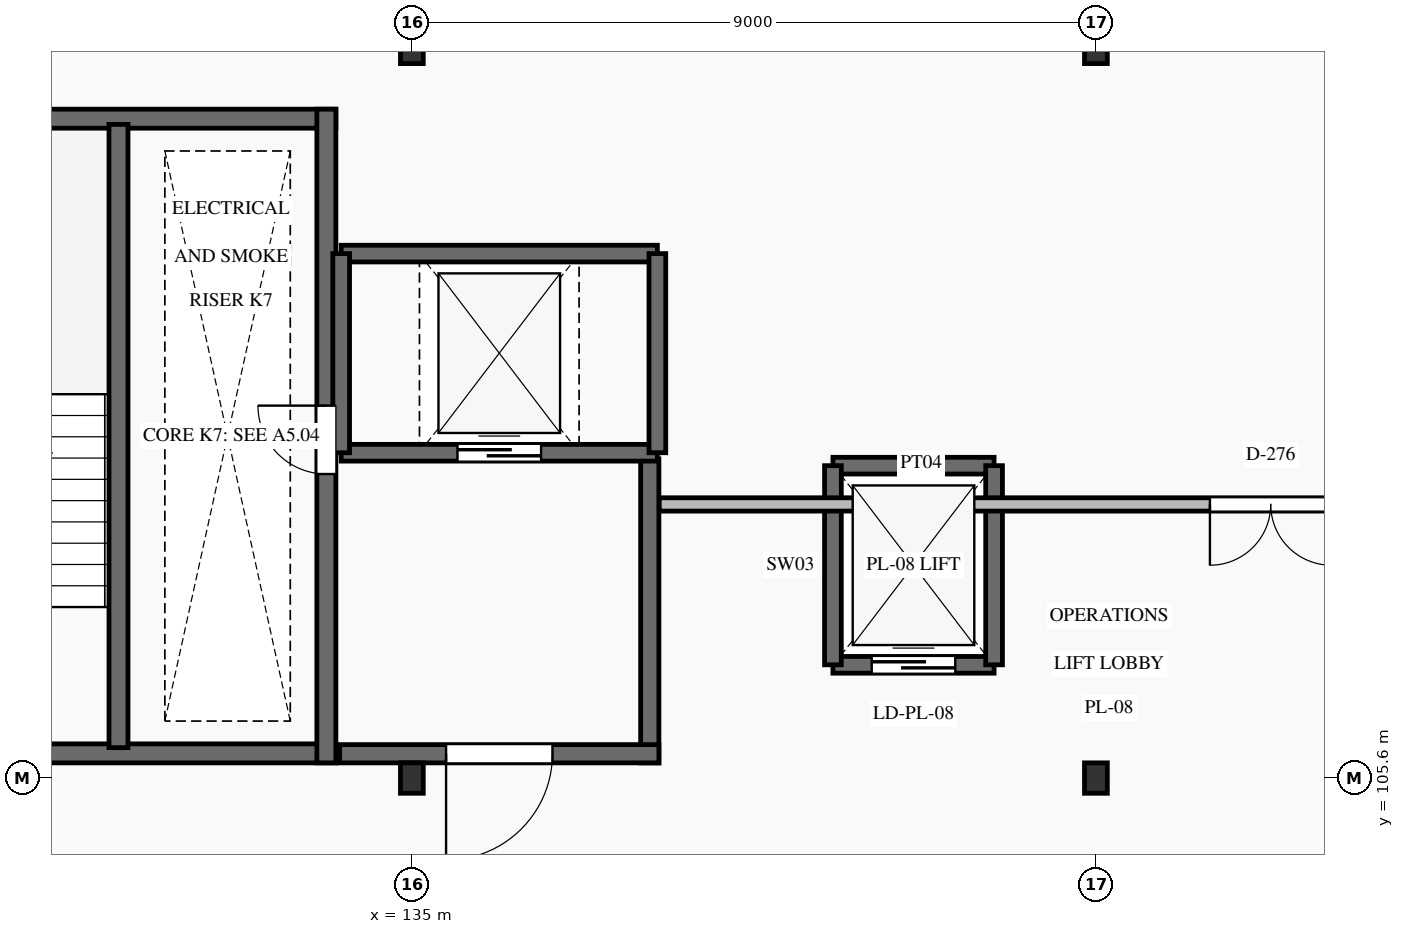
"""IFC4 building model, lengths in metres.
Left out: names, types, materials, properties, quantities, classifications, styles, units other than length and angle.
Written with IfcOpenShell. Run it as: python <this file> out.ifc"""

import sys

from ifc_helpers import new_model, si_unit, direction, frame, frame_2d, origin, origin_2d, place, context, subcontext, project, spatial, rectangle, i_section, extrude, element, fill, save


model = new_model("IFC4")
c1 = context("Model", 3, precision=1e-05, world=origin(), true_north=direction((0.0, 1.0)))
c2 = subcontext(c1, "Body", "Model", "MODEL_VIEW")
j1 = project(units=[si_unit("LENGTHUNIT", "METRE"), si_unit("PLANEANGLEUNIT", "RADIAN")], contexts=[c1])
p1 = place(None, origin())
s1 = spatial("IfcSite", under=j1, at=p1, CompositionType="ELEMENT")
p2 = place(p1, origin())
s2 = spatial("IfcBuilding", under=s1, at=p2, CompositionType="ELEMENT")
p3 = place(p2, frame((0.0, 0.0, 15.0)))
s3 = spatial("IfcBuildingStorey", under=s2, at=p3, CompositionType="ELEMENT", Elevation=15.0)
for number, where, z_axis, x_axis in (
    (1, (135.0, 105.6, 0.0), (0.0, 0.0, 1.0), (1.0, 0.0, 0.0)),
    (2, (135.0, 115.2, 0.0), (0.0, 0.0, 1.0), (1.0, 0.0, 0.0)),
    (3, (144.0, 105.6, 0.0), (0.0, 0.0, 1.0), (1.0, 0.0, 0.0)),
    (4, (144.0, 115.2, 0.0), (0.0, 0.0, 1.0), (1.0, 0.0, 0.0)),
):
    element("IfcColumn", number, at=place(p3, frame(where, z_axis=z_axis, x_axis=x_axis)), inside=s3, PredefinedType="COLUMN", context=c2, shape_type="SweptSolid", body=[
        extrude(i_section(OverallWidth=0.3, OverallDepth=0.4, WebThickness=0.013, FlangeThickness=0.024, FilletRadius=0.027, at=origin_2d()), origin(), (0.0, 0.0, 1.0), 3.9),
    ])
p4 = place(p3, frame((127.0, 105.925, 0.0), z_axis=(0.0, 0.0, 1.0), x_axis=(1.0, 0.0, 0.0)))
e5 = element("IfcWall", 5, at=p4, inside=s3, PredefinedType="SHEAR", context=c2, shape_type="SweptSolid", body=[
    extrude(rectangle(XDim=7.0, YDim=0.25, at=frame_2d((3.5, 0.0))), origin(), (0.0, 0.0, 1.0), 3.9),
])
p5 = place(p4, frame((1.25, 0.0, 0.0)))
e6 = element("IfcOpeningElement", 6, at=p5, cuts=e5, PredefinedType="OPENING", context=c2, shape_type="SweptSolid", body=[
    extrude(rectangle(XDim=1.2, YDim=2.15, at=frame_2d((0.6, 1.075))), frame((0.0, 0.14, 0.0), z_axis=(0.0, -1.0, 0.0), x_axis=(1.0, 0.0, 0.0)), (0.0, 0.0, 1.0), 0.28),
])
p6 = place(p3, frame((127.0, 114.275, 0.0), z_axis=(0.0, 0.0, 1.0), x_axis=(1.0, 0.0, 0.0)))
e7 = element("IfcWall", 7, at=p6, inside=s3, PredefinedType="SHEAR", context=c2, shape_type="SweptSolid", body=[
    extrude(rectangle(XDim=7.0, YDim=0.25, at=frame_2d((3.5, 0.0))), origin(), (0.0, 0.0, 1.0), 3.9),
])
p7 = place(p3, frame((133.875, 105.8, 0.0), z_axis=(0.0, 0.0, 1.0), x_axis=(0.0, 1.0, 0.0)))
e8 = element("IfcWall", 8, at=p7, inside=s3, PredefinedType="SHEAR", context=c2, shape_type="SweptSolid", body=[
    extrude(rectangle(XDim=8.6, YDim=0.25, at=frame_2d((4.3, 0.0))), origin(), (0.0, 0.0, 1.0), 3.9),
])
p8 = place(p7, frame((3.8, 0.0, 0.0)))
e9 = element("IfcOpeningElement", 9, at=p8, cuts=e8, PredefinedType="OPENING", context=c2, shape_type="SweptSolid", body=[
    extrude(rectangle(XDim=0.9, YDim=2.05, at=frame_2d((0.45, 1.025))), frame((0.0, 0.14, 0.0), z_axis=(0.0, -1.0, 0.0), x_axis=(1.0, 0.0, 0.0)), (0.0, 0.0, 1.0), 0.28),
])
p9 = place(p3, frame((131.14, 106.0, 0.0), z_axis=(0.0, 0.0, 1.0), x_axis=(0.0, 1.0, 0.0)))
e10 = element("IfcWall", 10, at=p9, inside=s3, PredefinedType="SHEAR", context=c2, shape_type="SweptSolid", body=[
    extrude(rectangle(XDim=8.2, YDim=0.25, at=frame_2d((4.1, 0.0))), origin(), (0.0, 0.0, 1.0), 3.9),
])
p10 = place(p3, frame((138.13, 105.8, 0.0), z_axis=(0.0, 0.0, 1.0), x_axis=(0.0, 1.0, 0.0)))
e11 = element("IfcWall", 11, at=p10, inside=s3, PredefinedType="SHEAR", context=c2, shape_type="SweptSolid", body=[
    extrude(rectangle(XDim=4.0, YDim=0.24, at=frame_2d((2.0, 0.0))), origin(), (0.0, 0.0, 1.0), 3.9),
])
p11 = place(p3, frame((134.05, 105.92, 0.0), z_axis=(0.0, 0.0, 1.0), x_axis=(1.0, 0.0, 0.0)))
e12 = element("IfcWall", 12, at=p11, inside=s3, PredefinedType="SHEAR", context=c2, shape_type="SweptSolid", body=[
    extrude(rectangle(XDim=4.2, YDim=0.24, at=frame_2d((2.1, 0.0))), origin(), (0.0, 0.0, 1.0), 3.9),
])
p12 = place(p11, frame((1.4, 0.0, 0.0)))
e13 = element("IfcOpeningElement", 13, at=p12, cuts=e12, PredefinedType="OPENING", context=c2, shape_type="SweptSolid", body=[
    extrude(rectangle(XDim=1.4, YDim=2.2, at=frame_2d((0.7, 1.1))), frame((0.0, 0.135, 0.0), z_axis=(0.0, -1.0, 0.0), x_axis=(1.0, 0.0, 0.0)), (0.0, 0.0, 1.0), 0.27),
])
p13 = place(p3, frame((140.54, 107.09, 0.0), z_axis=(0.0, 0.0, 1.0), x_axis=(1.0, 0.0, 0.0)))
e14 = element("IfcWall", 14, at=p13, inside=s3, PredefinedType="SHEAR", context=c2, shape_type="SweptSolid", body=[
    extrude(rectangle(XDim=2.12, YDim=0.22, at=frame_2d((1.06, 0.0))), origin(), (0.0, 0.0, 1.0), 3.9),
])
p14 = place(p13, frame((0.51, 0.0, 0.0)))
e15 = element("IfcOpeningElement", 15, at=p14, cuts=e14, PredefinedType="OPENING", context=c2, shape_type="SweptSolid", body=[
    extrude(rectangle(XDim=1.1, YDim=2.15, at=frame_2d((0.55, 1.075))), frame((0.0, 0.125, 0.0), z_axis=(0.0, -1.0, 0.0), x_axis=(1.0, 0.0, 0.0)), (0.0, 0.0, 1.0), 0.25),
])
p15 = place(p3, frame((140.54, 109.71, 0.0), z_axis=(0.0, 0.0, 1.0), x_axis=(1.0, 0.0, 0.0)))
e16 = element("IfcWall", 16, at=p15, inside=s3, PredefinedType="SHEAR", context=c2, shape_type="SweptSolid", body=[
    extrude(rectangle(XDim=2.12, YDim=0.22, at=frame_2d((1.06, 0.0))), origin(), (0.0, 0.0, 1.0), 3.9),
])
for number, where, z_axis, x_axis in (
    (17, (140.54, 107.09, 0.0), (0.0, 0.0, 1.0), (0.0, 1.0, 0.0)),
    (18, (142.66, 107.09, 0.0), (0.0, 0.0, 1.0), (0.0, 1.0, 0.0)),
):
    element("IfcWall", number, at=place(p3, frame(where, z_axis=z_axis, x_axis=x_axis)), inside=s3, PredefinedType="SHEAR", context=c2, shape_type="SweptSolid", body=[
        extrude(rectangle(XDim=2.62, YDim=0.22, at=frame_2d((1.31, 0.0))), origin(), (0.0, 0.0, 1.0), 3.9),
    ])
p16 = place(p3, frame((134.07, 109.88, 0.0), z_axis=(0.0, 0.0, 1.0), x_axis=(1.0, 0.0, 0.0)))
e19 = element("IfcWall", 19, at=p16, inside=s3, PredefinedType="SHEAR", context=c2, shape_type="SweptSolid", body=[
    extrude(rectangle(XDim=4.16, YDim=0.22, at=frame_2d((2.08, 0.0))), origin(), (0.0, 0.0, 1.0), 3.9),
])
p17 = place(p16, frame((1.53, 0.0, 0.0)))
e20 = element("IfcOpeningElement", 20, at=p17, cuts=e19, PredefinedType="OPENING", context=c2, shape_type="SweptSolid", body=[
    extrude(rectangle(XDim=1.1, YDim=2.15, at=frame_2d((0.55, 1.075))), frame((0.0, 0.125, 0.0), z_axis=(0.0, -1.0, 0.0), x_axis=(1.0, 0.0, 0.0)), (0.0, 0.0, 1.0), 0.25),
])
p18 = place(p3, frame((134.07, 112.5, 0.0), z_axis=(0.0, 0.0, 1.0), x_axis=(1.0, 0.0, 0.0)))
e21 = element("IfcWall", 21, at=p18, inside=s3, PredefinedType="SHEAR", context=c2, shape_type="SweptSolid", body=[
    extrude(rectangle(XDim=4.16, YDim=0.22, at=frame_2d((2.08, 0.0))), origin(), (0.0, 0.0, 1.0), 3.9),
])
for number, where, z_axis, x_axis in (
    (22, (134.07, 109.88, 0.0), (0.0, 0.0, 1.0), (0.0, 1.0, 0.0)),
    (23, (138.23, 109.88, 0.0), (0.0, 0.0, 1.0), (0.0, 1.0, 0.0)),
):
    element("IfcWall", number, at=place(p3, frame(where, z_axis=z_axis, x_axis=x_axis)), inside=s3, PredefinedType="SHEAR", context=c2, shape_type="SweptSolid", body=[
        extrude(rectangle(XDim=2.62, YDim=0.22, at=frame_2d((1.31, 0.0))), origin(), (0.0, 0.0, 1.0), 3.9),
    ])
p19 = place(p3, frame((138.255, 109.2, 0.0), z_axis=(0.0, 0.0, 1.0), x_axis=(1.0, 0.0, 0.0)))
e24 = element("IfcWall", 24, at=p19, inside=s3, PredefinedType="PARTITIONING", context=c2, shape_type="SweptSolid", body=[
    extrude(rectangle(XDim=15.54, YDim=0.175, at=frame_2d((7.77, 0.0))), origin(), (0.0, 0.0, 1.0), 3.64),
])
p20 = place(p19, frame((7.245, 0.0, 0.0)))
e25 = element("IfcOpeningElement", 25, at=p20, cuts=e24, PredefinedType="OPENING", context=c2, shape_type="SweptSolid", body=[
    extrude(rectangle(XDim=1.6, YDim=2.25, at=frame_2d((0.8, 1.125))), frame((0.0, 0.103, 0.0), z_axis=(0.0, -1.0, 0.0), x_axis=(1.0, 0.0, 0.0)), (0.0, 0.0, 1.0), 0.205),
])
p21 = place(p8, origin())
e26 = element("IfcDoor", 26, at=p21, inside=s3, OperationType="SINGLE_SWING_RIGHT", PredefinedType="DOOR", context=c2, shape_type="SweptSolid", body=[
    extrude(rectangle(XDim=0.9, YDim=2.05, at=frame_2d((0.45, 1.025))), frame((0.0, 0.025, 0.0), z_axis=(0.0, -1.0, 0.0), x_axis=(1.0, 0.0, 0.0)), (0.0, 0.0, 1.0), 0.05),
])
fill(e9, e26)
p22 = place(p12, frame((1.4, 0.0, 0.0), z_axis=(0.0, 0.0, 1.0), x_axis=(-1.0, 0.0, 0.0)))
e27 = element("IfcDoor", 27, at=p22, inside=s3, OperationType="SINGLE_SWING_LEFT", PredefinedType="DOOR", context=c2, shape_type="SweptSolid", body=[
    extrude(rectangle(XDim=1.4, YDim=2.2, at=frame_2d((0.7, 1.1))), frame((0.0, 0.025, 0.0), z_axis=(0.0, -1.0, 0.0), x_axis=(1.0, 0.0, 0.0)), (0.0, 0.0, 1.0), 0.05),
])
fill(e13, e27)
p23 = place(p14, origin())
e28 = element("IfcDoor", 28, at=p23, inside=s3, OperationType="SLIDING_TO_RIGHT", PredefinedType="DOOR", context=c2, shape_type="SweptSolid", body=[
    extrude(rectangle(XDim=1.1, YDim=2.15, at=frame_2d((0.55, 1.075))), frame((0.0, 0.025, 0.0), z_axis=(0.0, -1.0, 0.0), x_axis=(1.0, 0.0, 0.0)), (0.0, 0.0, 1.0), 0.05),
])
fill(e15, e28)
p24 = place(p17, origin())
e29 = element("IfcDoor", 29, at=p24, inside=s3, OperationType="SLIDING_TO_RIGHT", PredefinedType="DOOR", context=c2, shape_type="SweptSolid", body=[
    extrude(rectangle(XDim=1.1, YDim=2.15, at=frame_2d((0.55, 1.075))), frame((0.0, 0.025, 0.0), z_axis=(0.0, -1.0, 0.0), x_axis=(1.0, 0.0, 0.0)), (0.0, 0.0, 1.0), 0.05),
])
fill(e20, e29)
p25 = place(p20, frame((1.6, 0.0, 0.0), z_axis=(0.0, 0.0, 1.0), x_axis=(-1.0, 0.0, 0.0)))
e30 = element("IfcDoor", 30, at=p25, inside=s3, OperationType="DOUBLE_DOOR_SINGLE_SWING", PredefinedType="DOOR", context=c2, shape_type="SweptSolid", body=[
    extrude(rectangle(XDim=1.6, YDim=2.25, at=frame_2d((0.8, 1.125))), frame((0.0, 0.025, 0.0), z_axis=(0.0, -1.0, 0.0), x_axis=(1.0, 0.0, 0.0)), (0.0, 0.0, 1.0), 0.05),
])
fill(e25, e30)
save(model, sys.argv[1])
